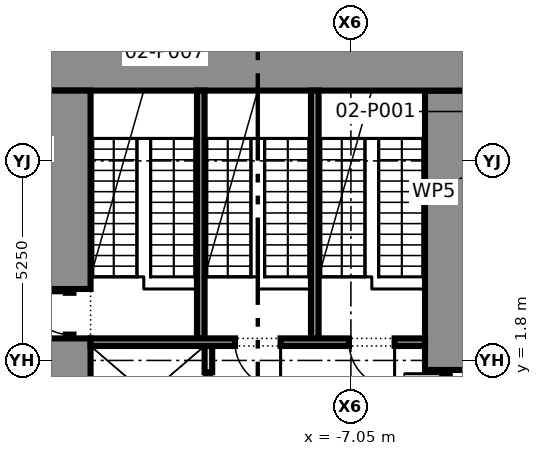
"""IFC4 building model, lengths in metres.
Left out: names, types, materials, properties, quantities, classifications, styles, units other than length and angle.
Written with IfcOpenShell. Run it as: python <this file> out.ifc"""

import sys

from ifc_helpers import new_model, si_unit, direction, frame, frame_2d, origin, place, context, subcontext, project, spatial, rectangle, extrude, element, fill, save


model = new_model("IFC4")
c1 = context("Model", 3, precision=1e-05, world=origin(), true_north=direction((0.0, 1.0)))
c2 = subcontext(c1, "Body", "Model", "MODEL_VIEW")
j1 = project(units=[si_unit("LENGTHUNIT", "METRE"), si_unit("PLANEANGLEUNIT", "RADIAN")], contexts=[c1])
p1 = place(None, origin())
s1 = spatial("IfcSite", under=j1, at=p1, CompositionType="ELEMENT")
p2 = place(p1, origin())
s2 = spatial("IfcBuilding", under=s1, at=p2, CompositionType="ELEMENT")
p3 = place(p2, frame((0.0, 0.0, 6.5)))
s3 = spatial("IfcBuildingStorey", under=s2, at=p3, CompositionType="ELEMENT", Elevation=6.5)
p4 = place(p3, frame((-15.0, 9.45, 0.0), z_axis=(0.0, 0.0, 1.0), x_axis=(1.0, 0.0, 0.0)))
e1 = element("IfcWall", 1, at=p4, inside=s3, PredefinedType="SHEAR", context=c2, shape_type="SweptSolid", body=[
    extrude(rectangle(XDim=11.0, YDim=1.1, at=frame_2d((5.5, 0.0))), origin(), (0.0, 0.0, 1.0), 4.575),
])
p5 = place(p3, frame((-14.45, -3.75, 0.0), z_axis=(0.0, 0.0, 1.0), x_axis=(0.0, 1.0, 0.0)))
e2 = element("IfcWall", 2, at=p5, inside=s3, PredefinedType="SHEAR", context=c2, shape_type="SweptSolid", body=[
    extrude(rectangle(XDim=6.13, YDim=1.1, at=frame_2d((3.065, 0.0))), origin(), (0.0, 0.0, 1.0), 4.575),
])
p6 = place(p3, frame((-14.45, 2.38, 0.0), z_axis=(0.0, 0.0, 1.0), x_axis=(0.0, 1.0, 0.0)))
e3 = element("IfcWall", 3, at=p6, inside=s3, PredefinedType="SHEAR", context=c2, shape_type="SweptSolid", body=[
    extrude(rectangle(XDim=1.3, YDim=0.2, at=frame_2d((0.65, 0.0))), origin(), (0.0, 0.0, 1.0), 2.4),
])
p7 = place(p6, frame((0.1, 0.0, 0.0)))
e4 = element("IfcOpeningElement", 4, at=p7, cuts=e3, PredefinedType="OPENING", context=c2, shape_type="SweptSolid", body=[
    extrude(rectangle(XDim=1.1, YDim=2.1, at=frame_2d((0.55, 1.05))), frame((0.0, 0.11, 0.0), z_axis=(0.0, -1.0, 0.0), x_axis=(1.0, 0.0, 0.0)), (0.0, 0.0, 1.0), 0.22),
])
p8 = place(p3, frame((-14.45, 3.68, 0.0), z_axis=(0.0, 0.0, 1.0), x_axis=(0.0, 1.0, 0.0)))
e5 = element("IfcWall", 5, at=p8, inside=s3, PredefinedType="SHEAR", context=c2, shape_type="SweptSolid", body=[
    extrude(rectangle(XDim=5.22, YDim=1.1, at=frame_2d((2.61, 0.0))), origin(), (0.0, 0.0, 1.0), 4.575),
])
p9 = place(p3, frame((-4.55, 0.25, 0.0), z_axis=(0.0, 0.0, 1.0), x_axis=(0.0, 1.0, 0.0)))
e6 = element("IfcWall", 6, at=p9, inside=s3, PredefinedType="PARTITIONING", context=c2, shape_type="SweptSolid", body=[
    extrude(rectangle(XDim=1.3, YDim=0.2, at=frame_2d((0.65, 0.0))), origin(), (0.0, 0.0, 1.0), 2.4),
])
p10 = place(p9, frame((0.1, 0.0, 0.0)))
e7 = element("IfcOpeningElement", 7, at=p10, cuts=e6, PredefinedType="OPENING", context=c2, shape_type="SweptSolid", body=[
    extrude(rectangle(XDim=1.1, YDim=2.1, at=frame_2d((0.55, 1.05))), frame((0.0, 0.11, 0.0), z_axis=(0.0, -1.0, 0.0), x_axis=(1.0, 0.0, 0.0)), (0.0, 0.0, 1.0), 0.22),
])
p11 = place(p3, frame((-4.55, 1.55, 0.0), z_axis=(0.0, 0.0, 1.0), x_axis=(0.0, 1.0, 0.0)))
e8 = element("IfcWall", 8, at=p11, inside=s3, PredefinedType="SHEAR", context=c2, shape_type="SweptSolid", body=[
    extrude(rectangle(XDim=7.35, YDim=1.1, at=frame_2d((3.675, 0.0))), origin(), (0.0, 0.0, 1.0), 4.575),
])
p12 = place(p3, frame((-10.8, -0.4, 0.0), z_axis=(0.0, 0.0, 1.0), x_axis=(0.0, 1.0, 0.0)))
e9 = element("IfcWall", 9, at=p12, inside=s3, PredefinedType="PARTITIONING", context=c2, shape_type="SweptSolid", body=[
    extrude(rectangle(XDim=2.58, YDim=0.2, at=frame_2d((1.29, 0.0))), origin(), (0.0, 0.0, 1.0), 4.575),
])
p13 = place(p12, frame((0.69, 0.0, 0.0)))
e10 = element("IfcOpeningElement", 10, at=p13, cuts=e9, PredefinedType="OPENING", context=c2, shape_type="SweptSolid", body=[
    extrude(rectangle(XDim=1.2, YDim=2.1, at=frame_2d((0.6, 1.05))), frame((0.0, 0.11, 0.0), z_axis=(0.0, -1.0, 0.0), x_axis=(1.0, 0.0, 0.0)), (0.0, 0.0, 1.0), 0.22),
])
p14 = place(p3, frame((-13.9, 2.28, 0.0), z_axis=(0.0, 0.0, 1.0), x_axis=(1.0, 0.0, 0.0)))
e11 = element("IfcWall", 11, at=p14, inside=s3, PredefinedType="SHEAR", context=c2, shape_type="SweptSolid", body=[
    extrude(rectangle(XDim=8.8, YDim=0.2, at=frame_2d((4.4, 0.0))), origin(), (0.0, 0.0, 1.0), 4.575),
])
p15 = place(p14, frame((3.8, 0.0, 0.0)))
e12 = element("IfcOpeningElement", 12, at=p15, cuts=e11, PredefinedType="OPENING", context=c2, shape_type="SweptSolid", body=[
    extrude(rectangle(XDim=1.2, YDim=2.1, at=frame_2d((0.6, 1.05))), frame((0.0, 0.11, 0.0), z_axis=(0.0, -1.0, 0.0), x_axis=(1.0, 0.0, 0.0)), (0.0, 0.0, 1.0), 0.22),
])
p16 = place(p14, frame((6.8, 0.0, 0.0)))
e13 = element("IfcOpeningElement", 13, at=p16, cuts=e11, PredefinedType="OPENING", context=c2, shape_type="SweptSolid", body=[
    extrude(rectangle(XDim=1.2, YDim=2.1, at=frame_2d((0.6, 1.05))), frame((0.0, 0.11, 0.0), z_axis=(0.0, -1.0, 0.0), x_axis=(1.0, 0.0, 0.0)), (0.0, 0.0, 1.0), 0.22),
])
for number, where, z_axis, x_axis in (
    (14, (-11.0, 2.38, 0.0), (0.0, 0.0, 1.0), (0.0, 1.0, 0.0)),
    (15, (-8.0, 2.38, 0.0), (0.0, 0.0, 1.0), (0.0, 1.0, 0.0)),
):
    element("IfcWall", number, at=place(p3, frame(where, z_axis=z_axis, x_axis=x_axis)), inside=s3, PredefinedType="SHEAR", context=c2, shape_type="SweptSolid", body=[
        extrude(rectangle(XDim=6.52, YDim=0.2, at=frame_2d((3.26, 0.0))), origin(), (0.0, 0.0, 1.0), 4.575),
    ])
p17 = place(p7, origin())
e16 = element("IfcDoor", 16, at=p17, inside=s3, OperationType="SINGLE_SWING_RIGHT", PredefinedType="DOOR", context=c2, shape_type="SweptSolid", body=[
    extrude(rectangle(XDim=1.1, YDim=2.1, at=frame_2d((0.55, 1.05))), frame((0.0, 0.025, 0.0), z_axis=(0.0, -1.0, 0.0), x_axis=(1.0, 0.0, 0.0)), (0.0, 0.0, 1.0), 0.05),
])
fill(e4, e16)
p18 = place(p10, origin())
e17 = element("IfcDoor", 17, at=p18, inside=s3, OperationType="SINGLE_SWING_RIGHT", PredefinedType="DOOR", context=c2, shape_type="SweptSolid", body=[
    extrude(rectangle(XDim=1.1, YDim=2.1, at=frame_2d((0.55, 1.05))), frame((0.0, 0.025, 0.0), z_axis=(0.0, -1.0, 0.0), x_axis=(1.0, 0.0, 0.0)), (0.0, 0.0, 1.0), 0.05),
])
fill(e7, e17)
p19 = place(p13, origin())
e18 = element("IfcDoor", 18, at=p19, inside=s3, OperationType="DOUBLE_DOOR_SLIDING", PredefinedType="DOOR", context=c2, shape_type="SweptSolid", body=[
    extrude(rectangle(XDim=1.2, YDim=2.1, at=frame_2d((0.6, 1.05))), frame((0.0, 0.025, 0.0), z_axis=(0.0, -1.0, 0.0), x_axis=(1.0, 0.0, 0.0)), (0.0, 0.0, 1.0), 0.05),
])
fill(e10, e18)
p20 = place(p15, frame((1.2, 0.0, 0.0), z_axis=(0.0, 0.0, 1.0), x_axis=(-1.0, 0.0, 0.0)))
e19 = element("IfcDoor", 19, at=p20, inside=s3, OperationType="SINGLE_SWING_LEFT", PredefinedType="DOOR", context=c2, shape_type="SweptSolid", body=[
    extrude(rectangle(XDim=1.2, YDim=2.1, at=frame_2d((0.6, 1.05))), frame((0.0, 0.025, 0.0), z_axis=(0.0, -1.0, 0.0), x_axis=(1.0, 0.0, 0.0)), (0.0, 0.0, 1.0), 0.05),
])
fill(e12, e19)
p21 = place(p16, frame((1.2, 0.0, 0.0), z_axis=(0.0, 0.0, 1.0), x_axis=(-1.0, 0.0, 0.0)))
e20 = element("IfcDoor", 20, at=p21, inside=s3, OperationType="SINGLE_SWING_LEFT", PredefinedType="DOOR", context=c2, shape_type="SweptSolid", body=[
    extrude(rectangle(XDim=1.2, YDim=2.1, at=frame_2d((0.6, 1.05))), frame((0.0, 0.025, 0.0), z_axis=(0.0, -1.0, 0.0), x_axis=(1.0, 0.0, 0.0)), (0.0, 0.0, 1.0), 0.05),
])
fill(e13, e20)
save(model, sys.argv[1])
